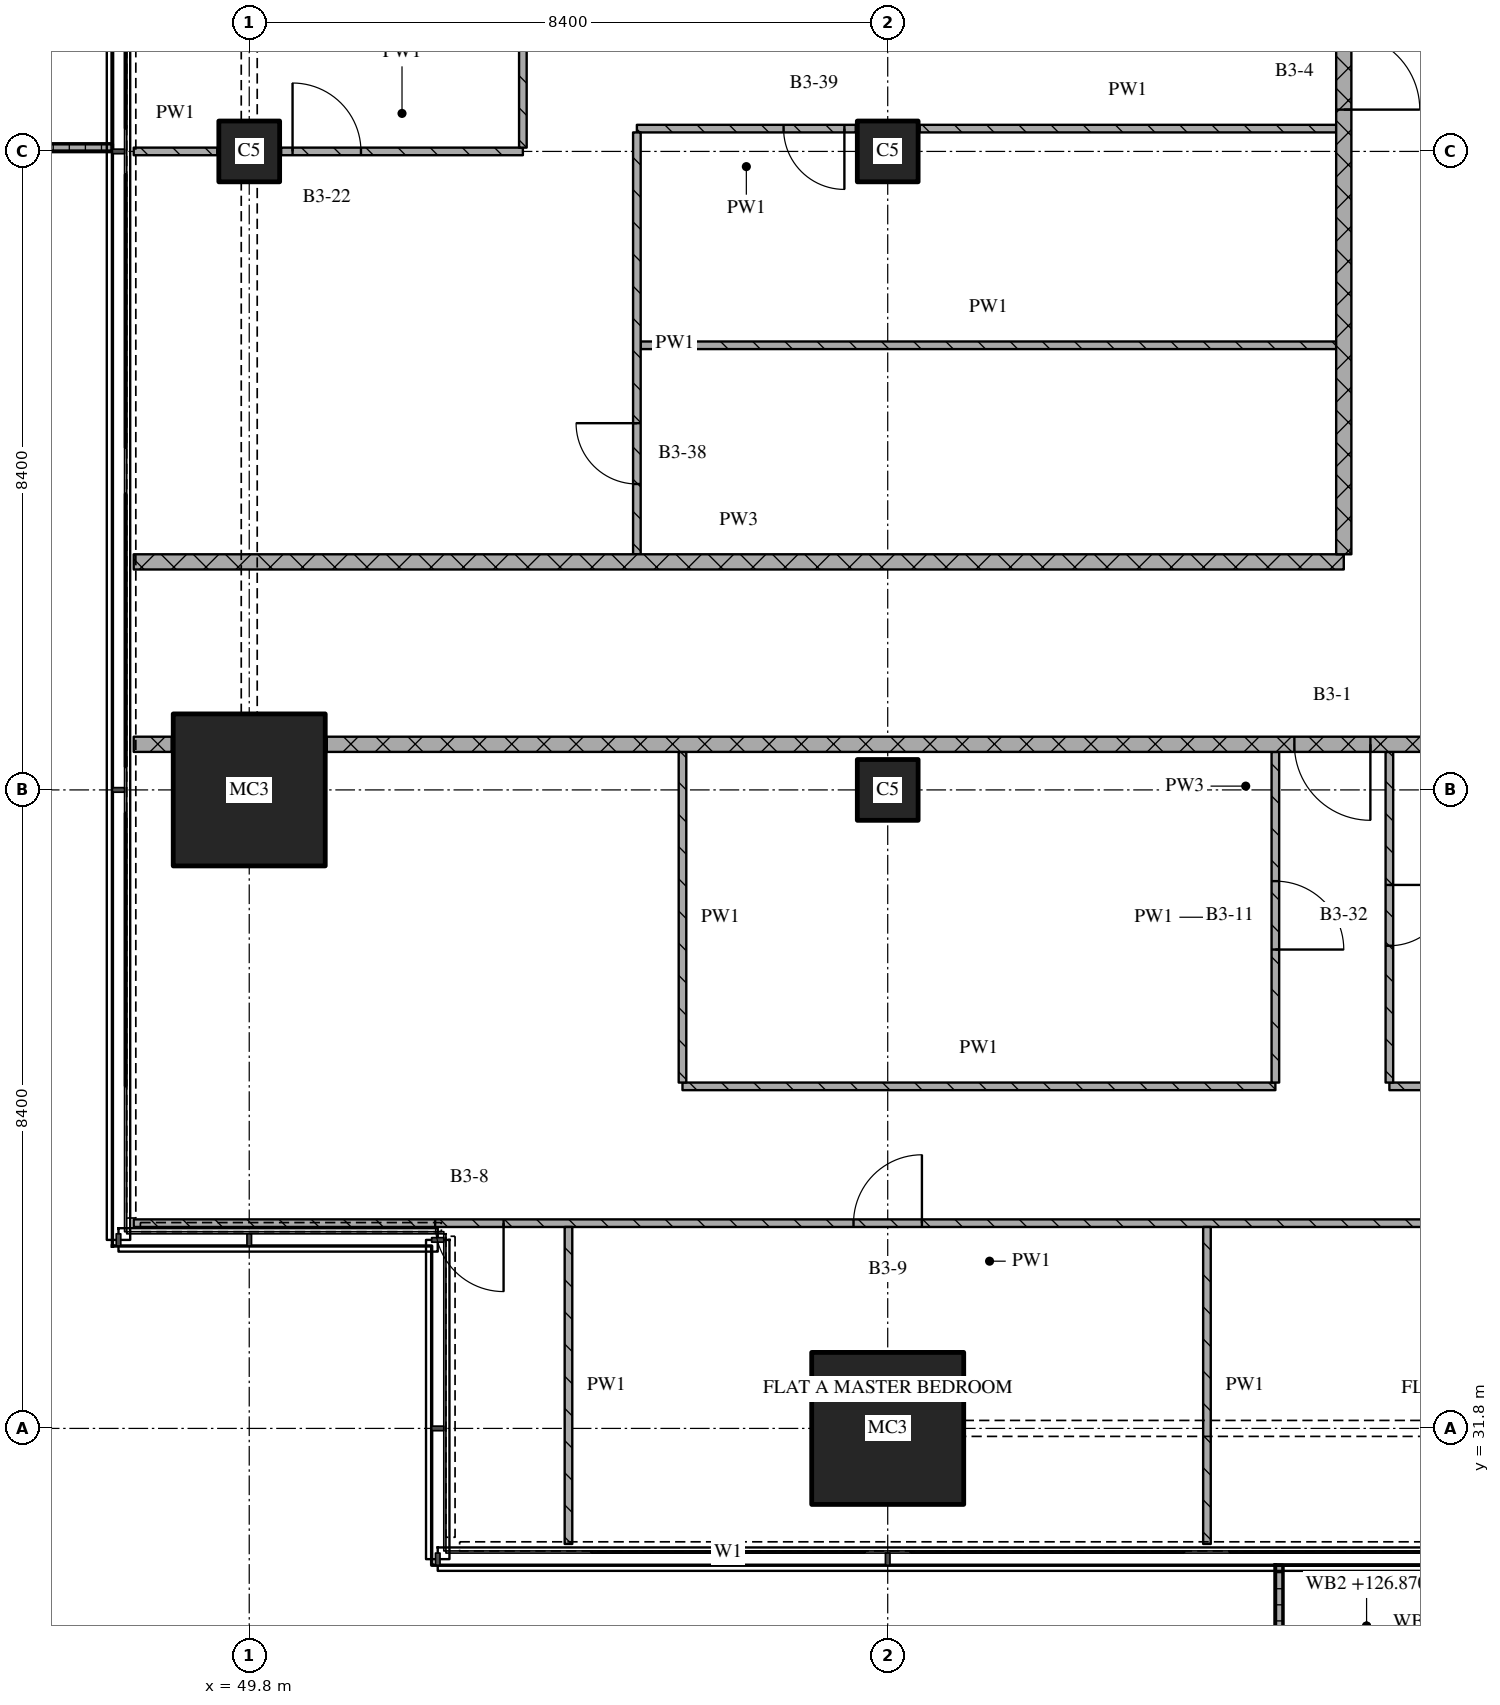
"""IFC4 building model, lengths in metres.
Left out: names, types, materials, properties, quantities, classifications, styles, units other than length and angle.
Written with IfcOpenShell. Run it as: python <this file> out.ifc"""

import sys

from ifc_helpers import new_model, si_unit, direction, frame, frame_2d, origin, origin_2d, place, context, subcontext, project, spatial, polyline, rectangle, outline, extrude, element, fill, save


model = new_model("IFC4")
c1 = context("Model", 3, precision=1e-05, world=origin(), true_north=direction((0.0, 1.0)))
c2 = subcontext(c1, "Body", "Model", "MODEL_VIEW")
j1 = project(units=[si_unit("LENGTHUNIT", "METRE"), si_unit("PLANEANGLEUNIT", "RADIAN")], contexts=[c1])
p1 = place(None, origin())
s1 = spatial("IfcSite", under=j1, at=p1, CompositionType="ELEMENT")
p2 = place(p1, origin())
s2 = spatial("IfcBuilding", under=s1, at=p2, CompositionType="ELEMENT")
p3 = place(p2, frame((0.0, 0.0, 124.05)))
s3 = spatial("IfcBuildingStorey", under=s2, at=p3, CompositionType="ELEMENT", Elevation=124.05)
p4 = place(p3, frame((49.8, 40.2, 0.0), z_axis=(0.0, 0.0, 1.0), x_axis=(1.0, 0.0, 0.0)))
e1 = element("IfcColumn", 1, at=p4, inside=s3, PredefinedType="COLUMN", context=c2, shape_type="SweptSolid", body=[
    extrude(rectangle(XDim=2.0, YDim=2.0, at=origin_2d()), origin(), (0.0, 0.0, 1.0), 3.6),
])
p5 = place(p3, frame((49.8, 48.6, 0.0), z_axis=(0.0, 0.0, 1.0), x_axis=(1.0, 0.0, 0.0)))
e2 = element("IfcColumn", 2, at=p5, inside=s3, PredefinedType="COLUMN", context=c2, shape_type="SweptSolid", body=[
    extrude(rectangle(XDim=0.8, YDim=0.8, at=origin_2d()), origin(), (0.0, 0.0, 1.0), 3.6),
])
p6 = place(p3, frame((58.2, 31.8, 0.0), z_axis=(0.0, 0.0, 1.0), x_axis=(1.0, 0.0, 0.0)))
e3 = element("IfcColumn", 3, at=p6, inside=s3, PredefinedType="COLUMN", context=c2, shape_type="SweptSolid", body=[
    extrude(rectangle(XDim=2.0, YDim=2.0, at=origin_2d()), origin(), (0.0, 0.0, 1.0), 3.6),
])
for number, where, z_axis, x_axis in (
    (4, (58.2, 40.2, 0.0), (0.0, 0.0, 1.0), (1.0, 0.0, 0.0)),
    (5, (58.2, 48.6, 0.0), (0.0, 0.0, 1.0), (1.0, 0.0, 0.0)),
):
    element("IfcColumn", number, at=place(p3, frame(where, z_axis=z_axis, x_axis=x_axis)), inside=s3, PredefinedType="COLUMN", context=c2, shape_type="SweptSolid", body=[
        extrude(rectangle(XDim=0.8, YDim=0.8, at=origin_2d()), origin(), (0.0, 0.0, 1.0), 3.6),
    ])
p7 = place(p3, origin())
e6 = element("IfcWall", 6, at=p7, inside=s3, PredefinedType="SOLIDWALL", context=c2, shape_type="SweptSolid", body=[
    extrude(outline(polyline([(63.3, 30.0), (63.4, 30.0), (63.4, 28.5), (65.6, 28.5), (65.6, 30.0), (65.7, 30.0), (65.7, 28.4), (63.3, 28.4), (63.3, 30.0)])), origin(), (0.0, 0.0, 1.0), 1.0),
])
p8 = place(p3, origin())
e7 = element("IfcWall", 7, at=p8, inside=s3, PredefinedType="SOLIDWALL", context=c2, shape_type="SweptSolid", body=[
    extrude(outline(polyline([(48.0, 52.8), (48.0, 52.7), (46.367, 52.7), (46.367, 48.7), (48.0, 48.7), (48.0, 48.6), (46.267, 48.6), (46.267, 52.8), (48.0, 52.8)])), origin(), (0.0, 0.0, 1.0), 1.0),
])
p9 = place(p3, frame((70.8, 34.5, 0.0), z_axis=(0.0, 0.0, 1.0), x_axis=(-1.0, 0.0, 0.0)))
e8 = element("IfcWall", 8, at=p9, inside=s3, PredefinedType="PARTITIONING", context=c2, shape_type="SweptSolid", body=[
    extrude(rectangle(XDim=22.52, YDim=0.1, at=frame_2d((11.26, 0.0))), origin(), (0.0, 0.0, 1.0), 3.32),
])
p10 = place(p9, frame((12.15, 0.0, 0.0)))
e9 = element("IfcOpeningElement", 9, at=p10, cuts=e8, PredefinedType="OPENING", context=c2, shape_type="SweptSolid", body=[
    extrude(rectangle(XDim=0.9, YDim=2.1, at=frame_2d((0.45, 1.05))), frame((0.0, 0.06, 0.0), z_axis=(0.0, -1.0, 0.0), x_axis=(1.0, 0.0, 0.0)), (0.0, 0.0, 1.0), 0.12),
])
p11 = place(p9, frame((17.654, 0.0, 0.0)))
e10 = element("IfcOpeningElement", 10, at=p11, cuts=e8, PredefinedType="OPENING", context=c2, shape_type="SweptSolid", body=[
    extrude(rectangle(XDim=0.9, YDim=2.1, at=frame_2d((0.45, 1.05))), frame((0.0, 0.06, 0.0), z_axis=(0.0, -1.0, 0.0), x_axis=(1.0, 0.0, 0.0)), (0.0, 0.0, 1.0), 0.12),
])
p12 = place(p3, frame((55.5, 36.3, 0.0), z_axis=(0.0, 0.0, 1.0), x_axis=(1.0, 0.0, 0.0)))
e11 = element("IfcWall", 11, at=p12, inside=s3, PredefinedType="PARTITIONING", context=c2, shape_type="SweptSolid", body=[
    extrude(rectangle(XDim=7.8, YDim=0.1, at=frame_2d((3.9, 0.0))), origin(), (0.0, 0.0, 1.0), 3.32),
])
p13 = place(p3, frame((64.8, 36.3, 0.0), z_axis=(0.0, 0.0, 1.0), x_axis=(1.0, 0.0, 0.0)))
e12 = element("IfcWall", 12, at=p13, inside=s3, PredefinedType="PARTITIONING", context=c2, shape_type="SweptSolid", body=[
    extrude(rectangle(XDim=10.1, YDim=0.1, at=frame_2d((5.05, 0.0))), origin(), (0.0, 0.0, 1.0), 3.32),
])
p14 = place(p13, frame((6.95, 0.0, 0.0)))
e13 = element("IfcOpeningElement", 13, at=p14, cuts=e12, PredefinedType="OPENING", context=c2, shape_type="SweptSolid", body=[
    extrude(rectangle(XDim=0.8, YDim=2.1, at=frame_2d((0.4, 1.05))), frame((0.0, 0.06, 0.0), z_axis=(0.0, -1.0, 0.0), x_axis=(1.0, 0.0, 0.0)), (0.0, 0.0, 1.0), 0.12),
])
p15 = place(p3, frame((48.28, 40.8, 0.0), z_axis=(0.0, 0.0, 1.0), x_axis=(1.0, 0.0, 0.0)))
e14 = element("IfcWall", 14, at=p15, inside=s3, PredefinedType="PARTITIONING", context=c2, shape_type="SweptSolid", body=[
    extrude(rectangle(XDim=0.5, YDim=0.2, at=frame_2d((0.25, 0.0))), origin(), (0.0, 0.0, 1.0), 3.32),
])
p16 = place(p3, frame((75.0, 40.8, 0.0), z_axis=(0.0, 0.0, 1.0), x_axis=(-1.0, 0.0, 0.0)))
e15 = element("IfcWall", 15, at=p16, inside=s3, PredefinedType="PARTITIONING", context=c2, shape_type="SweptSolid", body=[
    extrude(rectangle(XDim=24.18, YDim=0.2, at=frame_2d((12.09, 0.0))), origin(), (0.0, 0.0, 1.0), 3.32),
])
p17 = place(p16, frame((10.45, 0.0, 0.0)))
e16 = element("IfcOpeningElement", 16, at=p17, cuts=e15, PredefinedType="OPENING", context=c2, shape_type="SweptSolid", body=[
    extrude(rectangle(XDim=1.0, YDim=2.1, at=frame_2d((0.5, 1.05))), frame((0.0, 0.11, 0.0), z_axis=(0.0, -1.0, 0.0), x_axis=(1.0, 0.0, 0.0)), (0.0, 0.0, 1.0), 0.22),
])
p18 = place(p3, frame((48.28, 43.2, 0.0), z_axis=(0.0, 0.0, 1.0), x_axis=(1.0, 0.0, 0.0)))
e17 = element("IfcWall", 17, at=p18, inside=s3, PredefinedType="PARTITIONING", context=c2, shape_type="SweptSolid", body=[
    extrude(rectangle(XDim=15.92, YDim=0.2, at=frame_2d((7.96, 0.0))), origin(), (0.0, 0.0, 1.0), 3.32),
])
p19 = place(p3, frame((54.95, 46.05, 0.0), z_axis=(0.0, 0.0, 1.0), x_axis=(1.0, 0.0, 0.0)))
e18 = element("IfcWall", 18, at=p19, inside=s3, PredefinedType="PARTITIONING", context=c2, shape_type="SweptSolid", body=[
    extrude(rectangle(XDim=9.15, YDim=0.1, at=frame_2d((4.575, 0.0))), origin(), (0.0, 0.0, 1.0), 3.32),
])
p20 = place(p3, frame((48.28, 48.6, 0.0), z_axis=(0.0, 0.0, 1.0), x_axis=(1.0, 0.0, 0.0)))
e19 = element("IfcWall", 19, at=p20, inside=s3, PredefinedType="PARTITIONING", context=c2, shape_type="SweptSolid", body=[
    extrude(rectangle(XDim=1.1, YDim=0.1, at=frame_2d((0.55, 0.0))), origin(), (0.0, 0.0, 1.0), 3.32),
])
p21 = place(p3, frame((50.22, 48.6, 0.0), z_axis=(0.0, 0.0, 1.0), x_axis=(1.0, 0.0, 0.0)))
e20 = element("IfcWall", 20, at=p21, inside=s3, PredefinedType="PARTITIONING", context=c2, shape_type="SweptSolid", body=[
    extrude(rectangle(XDim=3.18, YDim=0.1, at=frame_2d((1.59, 0.0))), origin(), (0.0, 0.0, 1.0), 3.32),
])
p22 = place(p21, frame((0.15, 0.0, 0.0)))
e21 = element("IfcOpeningElement", 21, at=p22, cuts=e20, PredefinedType="OPENING", context=c2, shape_type="SweptSolid", body=[
    extrude(rectangle(XDim=0.9, YDim=2.1, at=frame_2d((0.45, 1.05))), frame((0.0, 0.06, 0.0), z_axis=(0.0, -1.0, 0.0), x_axis=(1.0, 0.0, 0.0)), (0.0, 0.0, 1.0), 0.12),
])
p23 = place(p3, frame((57.78, 48.9, 0.0), z_axis=(0.0, 0.0, 1.0), x_axis=(-1.0, 0.0, 0.0)))
e22 = element("IfcWall", 22, at=p23, inside=s3, PredefinedType="PARTITIONING", context=c2, shape_type="SweptSolid", body=[
    extrude(rectangle(XDim=2.88, YDim=0.1, at=frame_2d((1.44, 0.0))), origin(), (0.0, 0.0, 1.0), 3.32),
])
p24 = place(p23, frame((0.15, 0.0, 0.0)))
e23 = element("IfcOpeningElement", 23, at=p24, cuts=e22, PredefinedType="OPENING", context=c2, shape_type="SweptSolid", body=[
    extrude(rectangle(XDim=0.8, YDim=2.1, at=frame_2d((0.4, 1.05))), frame((0.0, 0.06, 0.0), z_axis=(0.0, -1.0, 0.0), x_axis=(1.0, 0.0, 0.0)), (0.0, 0.0, 1.0), 0.12),
])
p25 = place(p3, frame((58.62, 48.9, 0.0), z_axis=(0.0, 0.0, 1.0), x_axis=(1.0, 0.0, 0.0)))
e24 = element("IfcWall", 24, at=p25, inside=s3, PredefinedType="PARTITIONING", context=c2, shape_type="SweptSolid", body=[
    extrude(rectangle(XDim=5.48, YDim=0.1, at=frame_2d((2.74, 0.0))), origin(), (0.0, 0.0, 1.0), 3.32),
])
p26 = place(p3, frame((53.4, 48.65, 0.0), z_axis=(0.0, 0.0, 1.0), x_axis=(0.0, 1.0, 0.0)))
e25 = element("IfcWall", 25, at=p26, inside=s3, PredefinedType="PARTITIONING", context=c2, shape_type="SweptSolid", body=[
    extrude(rectangle(XDim=16.65, YDim=0.1, at=frame_2d((8.325, 0.0))), origin(), (0.0, 0.0, 1.0), 3.32),
])
p27 = place(p26, frame((12.1, 0.0, 0.0)))
e26 = element("IfcOpeningElement", 26, at=p27, cuts=e25, PredefinedType="OPENING", context=c2, shape_type="SweptSolid", body=[
    extrude(rectangle(XDim=0.9, YDim=2.1, at=frame_2d((0.45, 1.05))), frame((0.0, 0.06, 0.0), z_axis=(0.0, -1.0, 0.0), x_axis=(1.0, 0.0, 0.0)), (0.0, 0.0, 1.0), 0.12),
])
p28 = place(p3, frame((54.0, 34.45, 0.0), z_axis=(0.0, 0.0, 1.0), x_axis=(0.0, -1.0, 0.0)))
e27 = element("IfcWall", 27, at=p28, inside=s3, PredefinedType="PARTITIONING", context=c2, shape_type="SweptSolid", body=[
    extrude(rectangle(XDim=4.17, YDim=0.1, at=frame_2d((2.085, 0.0))), origin(), (0.0, 0.0, 1.0), 3.32),
])
p29 = place(p3, frame((54.9, 48.85, 0.0), z_axis=(0.0, 0.0, 1.0), x_axis=(0.0, -1.0, 0.0)))
e28 = element("IfcWall", 28, at=p29, inside=s3, PredefinedType="PARTITIONING", context=c2, shape_type="SweptSolid", body=[
    extrude(rectangle(XDim=5.55, YDim=0.1, at=frame_2d((2.775, 0.0))), origin(), (0.0, 0.0, 1.0), 3.32),
])
p30 = place(p29, frame((3.825, 0.0, 0.0)))
e29 = element("IfcOpeningElement", 29, at=p30, cuts=e28, PredefinedType="OPENING", context=c2, shape_type="SweptSolid", body=[
    extrude(rectangle(XDim=0.8, YDim=2.1, at=frame_2d((0.4, 1.05))), frame((0.0, 0.06, 0.0), z_axis=(0.0, -1.0, 0.0), x_axis=(1.0, 0.0, 0.0)), (0.0, 0.0, 1.0), 0.12),
])
p31 = place(p3, frame((55.5, 40.7, 0.0), z_axis=(0.0, 0.0, 1.0), x_axis=(0.0, -1.0, 0.0)))
e30 = element("IfcWall", 30, at=p31, inside=s3, PredefinedType="PARTITIONING", context=c2, shape_type="SweptSolid", body=[
    extrude(rectangle(XDim=4.35, YDim=0.1, at=frame_2d((2.175, 0.0))), origin(), (0.0, 0.0, 1.0), 3.32),
])
p32 = place(p3, frame((62.4, 34.45, 0.0), z_axis=(0.0, 0.0, 1.0), x_axis=(0.0, -1.0, 0.0)))
e31 = element("IfcWall", 31, at=p32, inside=s3, PredefinedType="PARTITIONING", context=c2, shape_type="SweptSolid", body=[
    extrude(rectangle(XDim=4.17, YDim=0.1, at=frame_2d((2.085, 0.0))), origin(), (0.0, 0.0, 1.0), 3.32),
])
p33 = place(p3, frame((63.3, 36.35, 0.0), z_axis=(0.0, 0.0, 1.0), x_axis=(0.0, 1.0, 0.0)))
e32 = element("IfcWall", 32, at=p33, inside=s3, PredefinedType="PARTITIONING", context=c2, shape_type="SweptSolid", body=[
    extrude(rectangle(XDim=4.35, YDim=0.1, at=frame_2d((2.175, 0.0))), origin(), (0.0, 0.0, 1.0), 3.32),
])
p34 = place(p33, frame((1.75, 0.0, 0.0)))
e33 = element("IfcOpeningElement", 33, at=p34, cuts=e32, PredefinedType="OPENING", context=c2, shape_type="SweptSolid", body=[
    extrude(rectangle(XDim=0.9, YDim=2.1, at=frame_2d((0.45, 1.05))), frame((0.0, 0.06, 0.0), z_axis=(0.0, -1.0, 0.0), x_axis=(1.0, 0.0, 0.0)), (0.0, 0.0, 1.0), 0.12),
])
p35 = place(p3, frame((64.2, 43.3, 0.0), z_axis=(0.0, 0.0, 1.0), x_axis=(0.0, 1.0, 0.0)))
e34 = element("IfcWall", 34, at=p35, inside=s3, PredefinedType="PARTITIONING", context=c2, shape_type="SweptSolid", body=[
    extrude(rectangle(XDim=32.02, YDim=0.2, at=frame_2d((16.01, 0.0))), origin(), (0.0, 0.0, 1.0), 3.32),
])
p36 = place(p35, frame((5.85, 0.0, 0.0)))
e35 = element("IfcOpeningElement", 35, at=p36, cuts=e34, PredefinedType="OPENING", context=c2, shape_type="SweptSolid", body=[
    extrude(rectangle(XDim=1.0, YDim=2.1, at=frame_2d((0.5, 1.05))), frame((0.0, 0.11, 0.0), z_axis=(0.0, -1.0, 0.0), x_axis=(1.0, 0.0, 0.0)), (0.0, 0.0, 1.0), 0.22),
])
p37 = place(p35, frame((25.95, 0.0, 0.0)))
e36 = element("IfcOpeningElement", 36, at=p37, cuts=e34, PredefinedType="OPENING", context=c2, shape_type="SweptSolid", body=[
    extrude(rectangle(XDim=1.0, YDim=2.1, at=frame_2d((0.5, 1.05))), frame((0.0, 0.11, 0.0), z_axis=(0.0, -1.0, 0.0), x_axis=(1.0, 0.0, 0.0)), (0.0, 0.0, 1.0), 0.22),
])
p38 = place(p3, frame((64.8, 40.7, 0.0), z_axis=(0.0, 0.0, 1.0), x_axis=(0.0, -1.0, 0.0)))
e37 = element("IfcWall", 37, at=p38, inside=s3, PredefinedType="PARTITIONING", context=c2, shape_type="SweptSolid", body=[
    extrude(rectangle(XDim=4.35, YDim=0.1, at=frame_2d((2.175, 0.0))), origin(), (0.0, 0.0, 1.0), 3.32),
])
p39 = place(p38, frame((1.75, 0.0, 0.0)))
e38 = element("IfcOpeningElement", 38, at=p39, cuts=e37, PredefinedType="OPENING", context=c2, shape_type="SweptSolid", body=[
    extrude(rectangle(XDim=0.8, YDim=2.1, at=frame_2d((0.4, 1.05))), frame((0.0, 0.06, 0.0), z_axis=(0.0, -1.0, 0.0), x_axis=(1.0, 0.0, 0.0)), (0.0, 0.0, 1.0), 0.12),
])
p40 = place(p10, origin())
e39 = element("IfcDoor", 39, at=p40, inside=s3, OperationType="SINGLE_SWING_RIGHT", PredefinedType="DOOR", context=c2, shape_type="SweptSolid", body=[
    extrude(rectangle(XDim=0.9, YDim=2.1, at=frame_2d((0.45, 1.05))), frame((0.0, 0.025, 0.0), z_axis=(0.0, -1.0, 0.0), x_axis=(1.0, 0.0, 0.0)), (0.0, 0.0, 1.0), 0.05),
])
fill(e9, e39)
p41 = place(p11, origin())
e40 = element("IfcDoor", 40, at=p41, inside=s3, OperationType="SINGLE_SWING_LEFT", PredefinedType="DOOR", context=c2, shape_type="SweptSolid", body=[
    extrude(rectangle(XDim=0.9, YDim=2.1, at=frame_2d((0.45, 1.05))), frame((0.0, 0.025, 0.0), z_axis=(0.0, -1.0, 0.0), x_axis=(1.0, 0.0, 0.0)), (0.0, 0.0, 1.0), 0.05),
])
fill(e10, e40)
p42 = place(p17, origin())
e41 = element("IfcDoor", 41, at=p42, inside=s3, OperationType="SINGLE_SWING_LEFT", PredefinedType="DOOR", context=c2, shape_type="SweptSolid", body=[
    extrude(rectangle(XDim=1.0, YDim=2.1, at=frame_2d((0.5, 1.05))), frame((0.0, 0.025, 0.0), z_axis=(0.0, -1.0, 0.0), x_axis=(1.0, 0.0, 0.0)), (0.0, 0.0, 1.0), 0.05),
])
fill(e16, e41)
p43 = place(p22, origin())
e42 = element("IfcDoor", 42, at=p43, inside=s3, OperationType="SINGLE_SWING_LEFT", PredefinedType="DOOR", context=c2, shape_type="SweptSolid", body=[
    extrude(rectangle(XDim=0.9, YDim=2.1, at=frame_2d((0.45, 1.05))), frame((0.0, 0.025, 0.0), z_axis=(0.0, -1.0, 0.0), x_axis=(1.0, 0.0, 0.0)), (0.0, 0.0, 1.0), 0.05),
])
fill(e21, e42)
p44 = place(p24, origin())
e43 = element("IfcDoor", 43, at=p44, inside=s3, OperationType="SINGLE_SWING_LEFT", PredefinedType="DOOR", context=c2, shape_type="SweptSolid", body=[
    extrude(rectangle(XDim=0.8, YDim=2.1, at=frame_2d((0.4, 1.05))), frame((0.0, 0.025, 0.0), z_axis=(0.0, -1.0, 0.0), x_axis=(1.0, 0.0, 0.0)), (0.0, 0.0, 1.0), 0.05),
])
fill(e23, e43)
p45 = place(p30, origin())
e44 = element("IfcDoor", 44, at=p45, inside=s3, OperationType="SINGLE_SWING_RIGHT", PredefinedType="DOOR", context=c2, shape_type="SweptSolid", body=[
    extrude(rectangle(XDim=0.8, YDim=2.1, at=frame_2d((0.4, 1.05))), frame((0.0, 0.025, 0.0), z_axis=(0.0, -1.0, 0.0), x_axis=(1.0, 0.0, 0.0)), (0.0, 0.0, 1.0), 0.05),
])
fill(e29, e44)
p46 = place(p34, origin())
e45 = element("IfcDoor", 45, at=p46, inside=s3, OperationType="SINGLE_SWING_RIGHT", PredefinedType="DOOR", context=c2, shape_type="SweptSolid", body=[
    extrude(rectangle(XDim=0.9, YDim=2.1, at=frame_2d((0.45, 1.05))), frame((0.0, 0.025, 0.0), z_axis=(0.0, -1.0, 0.0), x_axis=(1.0, 0.0, 0.0)), (0.0, 0.0, 1.0), 0.05),
])
fill(e33, e45)
p47 = place(p36, origin())
e46 = element("IfcDoor", 46, at=p47, inside=s3, OperationType="SINGLE_SWING_RIGHT", PredefinedType="DOOR", context=c2, shape_type="SweptSolid", body=[
    extrude(rectangle(XDim=1.0, YDim=2.1, at=frame_2d((0.5, 1.05))), frame((0.0, 0.025, 0.0), z_axis=(0.0, -1.0, 0.0), x_axis=(1.0, 0.0, 0.0)), (0.0, 0.0, 1.0), 0.05),
])
fill(e35, e46)
p48 = place(p39, origin())
e47 = element("IfcDoor", 47, at=p48, inside=s3, OperationType="SINGLE_SWING_LEFT", PredefinedType="DOOR", context=c2, shape_type="SweptSolid", body=[
    extrude(rectangle(XDim=0.8, YDim=2.1, at=frame_2d((0.4, 1.05))), frame((0.0, 0.025, 0.0), z_axis=(0.0, -1.0, 0.0), x_axis=(1.0, 0.0, 0.0)), (0.0, 0.0, 1.0), 0.05),
])
fill(e38, e47)
save(model, sys.argv[1])
